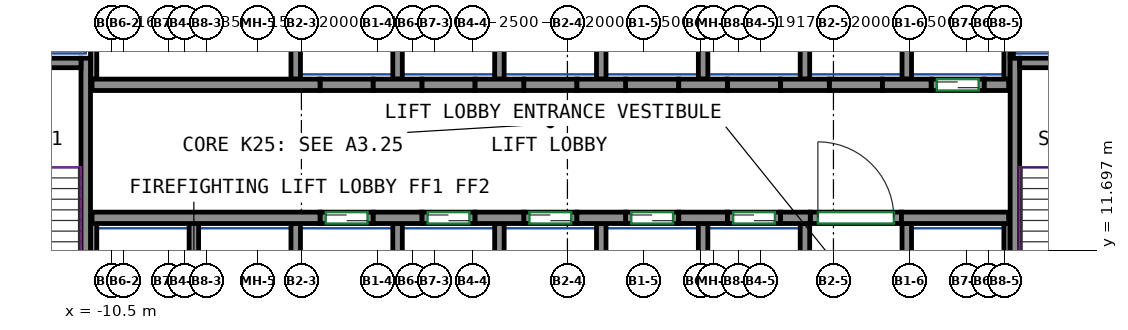
"""IFC4 building model, lengths in metres.
Left out: names, types, materials, properties, quantities, classifications, styles, units other than length and angle.
Written with IfcOpenShell. Run it as: python <this file> out.ifc"""

import sys

from ifc_helpers import new_model, si_unit, direction, frame, frame_2d, origin, place, context, subcontext, project, spatial, rectangle, extrude, source, transform, mapped, element, fill, save


model = new_model("IFC4")
c1 = context("Model", 3, precision=1e-05, world=origin(), true_north=direction((0.0, 1.0)))
c2 = subcontext(c1, "Body", "Model", "MODEL_VIEW")
j1 = project(units=[si_unit("LENGTHUNIT", "METRE"), si_unit("PLANEANGLEUNIT", "RADIAN")], contexts=[c1])
p1 = place(None, origin())
s1 = spatial("IfcSite", under=j1, at=p1, CompositionType="ELEMENT")
p2 = place(p1, origin())
s2 = spatial("IfcBuilding", under=s1, at=p2, CompositionType="ELEMENT")
p3 = place(p2, frame((0.0, 0.0, 104.6)))
s3 = spatial("IfcBuildingStorey", under=s2, at=p3, CompositionType="ELEMENT", Elevation=104.6)
m1 = source(origin(), c2, "Body", "SweptSolid", [
    extrude(rectangle(XDim=7.75, YDim=0.25, at=frame_2d((3.875, 0.0))), origin(), (0.0, 0.0, 1.0), 3.72),
])
p4 = place(p3, frame((-11.175, 9.0, 0.0), z_axis=(0.0, 0.0, 1.0), x_axis=(0.0, 1.0, 0.0)))
e1 = element("IfcWall", 1, at=p4, inside=s3, PredefinedType="SHEAR", context=c2, shape_type="MappedRepresentation", body=[
    mapped(m1, transform((0.0, 0.0, 0.0))),
])
m2 = source(origin(), c2, "Body", "SweptSolid", [
    extrude(rectangle(XDim=3.7, YDim=0.25, at=frame_2d((1.85, 0.0))), origin(), (0.0, 0.0, 1.0), 3.72),
])
p5 = place(p3, frame((-15.0, 16.625, 0.0), z_axis=(0.0, 0.0, 1.0), x_axis=(1.0, 0.0, 0.0)))
e2 = element("IfcWall", 2, at=p5, inside=s3, PredefinedType="SHEAR", context=c2, shape_type="MappedRepresentation", body=[
    mapped(m2, transform((0.0, 0.0, 0.0))),
])
p6 = place(p3, frame((13.275, 9.0, 0.0), z_axis=(0.0, 0.0, 1.0), x_axis=(0.0, 1.0, 0.0)))
e3 = element("IfcWall", 3, at=p6, inside=s3, PredefinedType="SHEAR", context=c2, shape_type="MappedRepresentation", body=[
    mapped(m1, transform((0.0, 0.0, 0.0))),
])
m3 = source(origin(), c2, "Body", "SweptSolid", [
    extrude(rectangle(XDim=3.7, YDim=0.25, at=frame_2d((1.85, 0.0))), origin(), (0.0, 0.0, 1.0), 3.72),
])
p7 = place(p3, frame((13.4, 16.625, 0.0), z_axis=(0.0, 0.0, 1.0), x_axis=(1.0, 0.0, 0.0)))
e4 = element("IfcWall", 4, at=p7, inside=s3, PredefinedType="SHEAR", context=c2, shape_type="MappedRepresentation", body=[
    mapped(m3, transform((0.0, 0.0, 0.0))),
])
m4 = source(origin(), c2, "Body", "SweptSolid", [
    extrude(rectangle(XDim=6.0, YDim=0.3, at=frame_2d((3.0, 0.0))), origin(), (0.0, 0.0, 1.0), 3.72),
])
p8 = place(p3, frame((-11.01, 12.55, 0.0), z_axis=(0.0, 0.0, 1.0), x_axis=(1.0, 0.0, 0.0)))
e5 = element("IfcWall", 5, at=p8, inside=s3, PredefinedType="SHEAR", context=c2, shape_type="MappedRepresentation", body=[
    mapped(m4, transform((0.0, 0.0, 0.0))),
])
m5 = source(origin(), c2, "Body", "SweptSolid", [
    extrude(rectangle(XDim=1.28, YDim=0.3, at=frame_2d((0.64, 0.0))), origin(), (0.0, 0.0, 1.0), 3.72),
])
for number, where, z_axis, x_axis in (
    (6, (-3.61, 12.55, 0.0), (0.0, 0.0, 1.0), (1.0, 0.0, 0.0)),
    (7, (-0.93, 12.55, 0.0), (0.0, 0.0, 1.0), (1.0, 0.0, 0.0)),
    (8, (1.75, 12.55, 0.0), (0.0, 0.0, 1.0), (1.0, 0.0, 0.0)),
    (9, (4.43, 12.55, 0.0), (0.0, 0.0, 1.0), (1.0, 0.0, 0.0)),
):
    element("IfcWall", number, at=place(p3, frame(where, z_axis=z_axis, x_axis=x_axis)), inside=s3, PredefinedType="SHEAR", context=c2, shape_type="MappedRepresentation", body=[
        mapped(m5, transform((0.0, 0.0, 0.0))),
    ])
m6 = source(origin(), c2, "Body", "SweptSolid", [
    extrude(rectangle(XDim=0.78, YDim=0.3, at=frame_2d((0.39, 0.0))), origin(), (0.0, 0.0, 1.0), 3.72),
])
p9 = place(p3, frame((7.11, 12.55, 0.0), z_axis=(0.0, 0.0, 1.0), x_axis=(1.0, 0.0, 0.0)))
e10 = element("IfcWall", 10, at=p9, inside=s3, PredefinedType="SHEAR", context=c2, shape_type="MappedRepresentation", body=[
    mapped(m6, transform((0.0, 0.0, 0.0))),
])
m7 = source(origin(), c2, "Body", "SweptSolid", [
    extrude(rectangle(XDim=2.82, YDim=0.3, at=frame_2d((1.41, 0.0))), origin(), (0.0, 0.0, 1.0), 3.72),
])
p10 = place(p3, frame((10.29, 12.55, 0.0), z_axis=(0.0, 0.0, 1.0), x_axis=(1.0, 0.0, 0.0)))
e11 = element("IfcWall", 11, at=p10, inside=s3, PredefinedType="SHEAR", context=c2, shape_type="MappedRepresentation", body=[
    mapped(m7, transform((0.0, 0.0, 0.0))),
])
p11 = place(p3, frame((-11.01, 16.05, 0.0), z_axis=(0.0, 0.0, 1.0), x_axis=(1.0, 0.0, 0.0)))
e12 = element("IfcWall", 12, at=p11, inside=s3, PredefinedType="SHEAR", context=c2, shape_type="MappedRepresentation", body=[
    mapped(m4, transform((0.0, 0.0, 0.0))),
])
for number, where, z_axis, x_axis in (
    (13, (-3.61, 16.05, 0.0), (0.0, 0.0, 1.0), (1.0, 0.0, 0.0)),
    (14, (-0.93, 16.05, 0.0), (0.0, 0.0, 1.0), (1.0, 0.0, 0.0)),
    (15, (1.75, 16.05, 0.0), (0.0, 0.0, 1.0), (1.0, 0.0, 0.0)),
    (16, (4.43, 16.05, 0.0), (0.0, 0.0, 1.0), (1.0, 0.0, 0.0)),
):
    element("IfcWall", number, at=place(p3, frame(where, z_axis=z_axis, x_axis=x_axis)), inside=s3, PredefinedType="SHEAR", context=c2, shape_type="MappedRepresentation", body=[
        mapped(m5, transform((0.0, 0.0, 0.0))),
    ])
m8 = source(origin(), c2, "Body", "SweptSolid", [
    extrude(rectangle(XDim=1.28, YDim=0.3, at=frame_2d((0.64, 0.0))), origin(), (0.0, 0.0, 1.0), 3.72),
])
p12 = place(p3, frame((7.11, 16.05, 0.0), z_axis=(0.0, 0.0, 1.0), x_axis=(1.0, 0.0, 0.0)))
e17 = element("IfcWall", 17, at=p12, inside=s3, PredefinedType="SHEAR", context=c2, shape_type="MappedRepresentation", body=[
    mapped(m8, transform((0.0, 0.0, 0.0))),
])
p13 = place(p3, frame((9.79, 16.05, 0.0), z_axis=(0.0, 0.0, 1.0), x_axis=(1.0, 0.0, 0.0)))
e18 = element("IfcWall", 18, at=p13, inside=s3, PredefinedType="SHEAR", context=c2, shape_type="MappedRepresentation", body=[
    mapped(m5, transform((0.0, 0.0, 0.0))),
])
m9 = source(origin(), c2, "Body", "SweptSolid", [
    extrude(rectangle(XDim=0.64, YDim=0.3, at=frame_2d((0.32, 0.0))), origin(), (0.0, 0.0, 1.0), 3.72),
])
p14 = place(p3, frame((12.47, 16.05, 0.0), z_axis=(0.0, 0.0, 1.0), x_axis=(1.0, 0.0, 0.0)))
e19 = element("IfcWall", 19, at=p14, inside=s3, PredefinedType="SHEAR", context=c2, shape_type="MappedRepresentation", body=[
    mapped(m9, transform((0.0, 0.0, 0.0))),
])
m10 = source(origin(), c2, "Body", "SweptSolid", [
    extrude(rectangle(XDim=1.4, YDim=0.3, at=frame_2d((0.7, 0.0))), origin(), (0.0, 0.0, 1.0), 3.72),
])
p15 = place(p3, frame((-5.01, 12.55, 0.0), z_axis=(0.0, 0.0, 1.0), x_axis=(1.0, 0.0, 0.0)))
e20 = element("IfcWall", 20, at=p15, inside=s3, PredefinedType="PARTITIONING", context=c2, shape_type="MappedRepresentation", body=[
    mapped(m10, transform((0.0, 0.0, 0.0))),
])
p16 = place(p15, frame((0.15, 0.0, 0.0)))
e21 = element("IfcOpeningElement", 21, at=p16, cuts=e20, PredefinedType="OPENING", context=c2, shape_type="SweptSolid", body=[
    extrude(rectangle(XDim=1.1, YDim=2.1, at=frame_2d((0.55, 1.05))), frame((0.0, 0.16, 0.0), z_axis=(0.0, -1.0, 0.0), x_axis=(1.0, 0.0, 0.0)), (0.0, 0.0, 1.0), 0.32),
])
m11 = source(origin(), c2, "Body", "SweptSolid", [
    extrude(rectangle(XDim=1.4, YDim=0.3, at=frame_2d((0.7, 0.0))), origin(), (0.0, 0.0, 1.0), 3.72),
])
p17 = place(p3, frame((-2.33, 12.55, 0.0), z_axis=(0.0, 0.0, 1.0), x_axis=(1.0, 0.0, 0.0)))
e22 = element("IfcWall", 22, at=p17, inside=s3, PredefinedType="PARTITIONING", context=c2, shape_type="MappedRepresentation", body=[
    mapped(m11, transform((0.0, 0.0, 0.0))),
])
p18 = place(p17, frame((0.15, 0.0, 0.0)))
e23 = element("IfcOpeningElement", 23, at=p18, cuts=e22, PredefinedType="OPENING", context=c2, shape_type="SweptSolid", body=[
    extrude(rectangle(XDim=1.1, YDim=2.1, at=frame_2d((0.55, 1.05))), frame((0.0, 0.16, 0.0), z_axis=(0.0, -1.0, 0.0), x_axis=(1.0, 0.0, 0.0)), (0.0, 0.0, 1.0), 0.32),
])
p19 = place(p3, frame((0.35, 12.55, 0.0), z_axis=(0.0, 0.0, 1.0), x_axis=(1.0, 0.0, 0.0)))
e24 = element("IfcWall", 24, at=p19, inside=s3, PredefinedType="PARTITIONING", context=c2, shape_type="MappedRepresentation", body=[
    mapped(m10, transform((0.0, 0.0, 0.0))),
])
p20 = place(p19, frame((0.15, 0.0, 0.0)))
e25 = element("IfcOpeningElement", 25, at=p20, cuts=e24, PredefinedType="OPENING", context=c2, shape_type="SweptSolid", body=[
    extrude(rectangle(XDim=1.1, YDim=2.1, at=frame_2d((0.55, 1.05))), frame((0.0, 0.16, 0.0), z_axis=(0.0, -1.0, 0.0), x_axis=(1.0, 0.0, 0.0)), (0.0, 0.0, 1.0), 0.32),
])
p21 = place(p3, frame((3.03, 12.55, 0.0), z_axis=(0.0, 0.0, 1.0), x_axis=(1.0, 0.0, 0.0)))
e26 = element("IfcWall", 26, at=p21, inside=s3, PredefinedType="PARTITIONING", context=c2, shape_type="MappedRepresentation", body=[
    mapped(m10, transform((0.0, 0.0, 0.0))),
])
p22 = place(p21, frame((0.15, 0.0, 0.0)))
e27 = element("IfcOpeningElement", 27, at=p22, cuts=e26, PredefinedType="OPENING", context=c2, shape_type="SweptSolid", body=[
    extrude(rectangle(XDim=1.1, YDim=2.1, at=frame_2d((0.55, 1.05))), frame((0.0, 0.16, 0.0), z_axis=(0.0, -1.0, 0.0), x_axis=(1.0, 0.0, 0.0)), (0.0, 0.0, 1.0), 0.32),
])
p23 = place(p3, frame((5.71, 12.55, 0.0), z_axis=(0.0, 0.0, 1.0), x_axis=(1.0, 0.0, 0.0)))
e28 = element("IfcWall", 28, at=p23, inside=s3, PredefinedType="PARTITIONING", context=c2, shape_type="MappedRepresentation", body=[
    mapped(m11, transform((0.0, 0.0, 0.0))),
])
p24 = place(p23, frame((0.15, 0.0, 0.0)))
e29 = element("IfcOpeningElement", 29, at=p24, cuts=e28, PredefinedType="OPENING", context=c2, shape_type="SweptSolid", body=[
    extrude(rectangle(XDim=1.1, YDim=2.1, at=frame_2d((0.55, 1.05))), frame((0.0, 0.16, 0.0), z_axis=(0.0, -1.0, 0.0), x_axis=(1.0, 0.0, 0.0)), (0.0, 0.0, 1.0), 0.32),
])
p25 = place(p3, frame((11.07, 16.05, 0.0), z_axis=(0.0, 0.0, 1.0), x_axis=(1.0, 0.0, 0.0)))
e30 = element("IfcWall", 30, at=p25, inside=s3, PredefinedType="PARTITIONING", context=c2, shape_type="MappedRepresentation", body=[
    mapped(m10, transform((0.0, 0.0, 0.0))),
])
p26 = place(p25, frame((0.15, 0.0, 0.0)))
e31 = element("IfcOpeningElement", 31, at=p26, cuts=e30, PredefinedType="OPENING", context=c2, shape_type="SweptSolid", body=[
    extrude(rectangle(XDim=1.1, YDim=2.1, at=frame_2d((0.55, 1.05))), frame((0.0, 0.16, 0.0), z_axis=(0.0, -1.0, 0.0), x_axis=(1.0, 0.0, 0.0)), (0.0, 0.0, 1.0), 0.32),
])
m12 = source(origin(), c2, "Body", "SweptSolid", [
    extrude(rectangle(XDim=2.4, YDim=0.3, at=frame_2d((1.2, 0.0))), origin(), (0.0, 0.0, 1.0), 3.72),
])
p27 = place(p3, frame((7.89, 12.55, 0.0), z_axis=(0.0, 0.0, 1.0), x_axis=(1.0, 0.0, 0.0)))
e32 = element("IfcWall", 32, at=p27, inside=s3, PredefinedType="PARTITIONING", context=c2, shape_type="MappedRepresentation", body=[
    mapped(m12, transform((0.0, 0.0, 0.0))),
])
p28 = place(p27, frame((0.2, 0.0, 0.0)))
e33 = element("IfcOpeningElement", 33, at=p28, cuts=e32, PredefinedType="OPENING", context=c2, shape_type="SweptSolid", body=[
    extrude(rectangle(XDim=2.0, YDim=2.1, at=frame_2d((1.0, 1.05))), frame((0.0, 0.16, 0.0), z_axis=(0.0, -1.0, 0.0), x_axis=(1.0, 0.0, 0.0)), (0.0, 0.0, 1.0), 0.32),
])
p29 = place(p3, frame((-5.01, 16.05, 0.0), z_axis=(0.0, 0.0, 1.0), x_axis=(1.0, 0.0, 0.0)))
e34 = element("IfcWall", 34, at=p29, inside=s3, PredefinedType="PARTITIONING", context=c2, shape_type="MappedRepresentation", body=[
    mapped(m10, transform((0.0, 0.0, 0.0))),
])
p30 = place(p3, frame((-2.33, 16.05, 0.0), z_axis=(0.0, 0.0, 1.0), x_axis=(1.0, 0.0, 0.0)))
e35 = element("IfcWall", 35, at=p30, inside=s3, PredefinedType="PARTITIONING", context=c2, shape_type="MappedRepresentation", body=[
    mapped(m11, transform((0.0, 0.0, 0.0))),
])
for number, where, z_axis, x_axis in (
    (36, (0.35, 16.05, 0.0), (0.0, 0.0, 1.0), (1.0, 0.0, 0.0)),
    (37, (3.03, 16.05, 0.0), (0.0, 0.0, 1.0), (1.0, 0.0, 0.0)),
):
    element("IfcWall", number, at=place(p3, frame(where, z_axis=z_axis, x_axis=x_axis)), inside=s3, PredefinedType="PARTITIONING", context=c2, shape_type="MappedRepresentation", body=[
        mapped(m10, transform((0.0, 0.0, 0.0))),
    ])
for number, where, z_axis, x_axis in (
    (38, (5.71, 16.05, 0.0), (0.0, 0.0, 1.0), (1.0, 0.0, 0.0)),
    (39, (8.39, 16.05, 0.0), (0.0, 0.0, 1.0), (1.0, 0.0, 0.0)),
):
    element("IfcWall", number, at=place(p3, frame(where, z_axis=z_axis, x_axis=x_axis)), inside=s3, PredefinedType="PARTITIONING", context=c2, shape_type="MappedRepresentation", body=[
        mapped(m11, transform((0.0, 0.0, 0.0))),
    ])
m13 = source(origin(), c2, "Body", "SweptSolid", [
    extrude(rectangle(XDim=3.275, YDim=0.165, at=frame_2d((1.638, 0.0))), origin(), (0.0, 0.0, 1.0), 3.72),
])
p31 = place(p3, frame((13.067, 16.2, 0.0), z_axis=(0.0, 0.0, 1.0), x_axis=(0.0, 1.0, 0.0)))
e40 = element("IfcWall", 40, at=p31, inside=s3, PredefinedType="PARTITIONING", context=c2, shape_type="MappedRepresentation", body=[
    mapped(m13, transform((0.0, 0.0, 0.0))),
])
m14 = source(origin(), c2, "Body", "SweptSolid", [
    extrude(rectangle(XDim=4.8, YDim=0.165, at=frame_2d((2.4, 0.0))), origin(), (0.0, 0.0, 1.0), 3.72),
])
p32 = place(p3, frame((-10.968, 16.2, 0.0), z_axis=(0.0, 0.0, 1.0), x_axis=(0.0, 1.0, 0.0)))
e41 = element("IfcWall", 41, at=p32, inside=s3, PredefinedType="PARTITIONING", context=c2, shape_type="MappedRepresentation", body=[
    mapped(m14, transform((0.0, 0.0, 0.0))),
])
m15 = source(origin(), c2, "Body", "SweptSolid", [
    extrude(rectangle(XDim=3.275, YDim=0.25, at=frame_2d((1.638, 0.0))), origin(), (0.0, 0.0, 1.0), 3.72),
])
p33 = place(p3, frame((10.43, 16.2, 0.0), z_axis=(0.0, 0.0, 1.0), x_axis=(0.0, 1.0, 0.0)))
e42 = element("IfcWall", 42, at=p33, inside=s3, PredefinedType="PARTITIONING", context=c2, shape_type="MappedRepresentation", body=[
    mapped(m15, transform((0.0, 0.0, 0.0))),
])
m16 = source(origin(), c2, "Body", "SweptSolid", [
    extrude(rectangle(XDim=2.725, YDim=0.085, at=frame_2d((1.363, 0.0))), origin(), (0.0, 0.0, 1.0), 3.72),
])
p34 = place(p3, frame((13.192, 16.75, 0.0), z_axis=(0.0, 0.0, 1.0), x_axis=(0.0, 1.0, 0.0)))
e43 = element("IfcWall", 43, at=p34, inside=s3, PredefinedType="PARTITIONING", context=c2, shape_type="MappedRepresentation", body=[
    mapped(m16, transform((0.0, 0.0, 0.0))),
])
for number, where, z_axis, x_axis in (
    (44, (2.39, 16.2, 0.0), (0.0, 0.0, 1.0), (0.0, 1.0, 0.0)),
    (45, (5.07, 16.2, 0.0), (0.0, 0.0, 1.0), (0.0, 1.0, 0.0)),
    (46, (7.75, 16.2, 0.0), (0.0, 0.0, 1.0), (0.0, 1.0, 0.0)),
    (47, (-0.29, 16.2, 0.0), (0.0, 0.0, 1.0), (0.0, 1.0, 0.0)),
    (48, (-2.97, 16.2, 0.0), (0.0, 0.0, 1.0), (0.0, 1.0, 0.0)),
    (49, (-5.65, 16.2, 0.0), (0.0, 0.0, 1.0), (0.0, 1.0, 0.0)),
):
    element("IfcWall", number, at=place(p3, frame(where, z_axis=z_axis, x_axis=x_axis)), inside=s3, PredefinedType="PARTITIONING", context=c2, shape_type="MappedRepresentation", body=[
        mapped(m15, transform((0.0, 0.0, 0.0))),
    ])
m17 = source(origin(), c2, "Body", "SweptSolid", [
    extrude(rectangle(XDim=3.4, YDim=0.25, at=frame_2d((1.7, 0.0))), origin(), (0.0, 0.0, 1.0), 3.72),
])
p35 = place(p3, frame((10.43, 9.0, 0.0), z_axis=(0.0, 0.0, 1.0), x_axis=(0.0, 1.0, 0.0)))
e50 = element("IfcWall", 50, at=p35, inside=s3, PredefinedType="PARTITIONING", context=c2, shape_type="MappedRepresentation", body=[
    mapped(m17, transform((0.0, 0.0, 0.0))),
])
m18 = source(origin(), c2, "Body", "SweptSolid", [
    extrude(rectangle(XDim=3.4, YDim=0.165, at=frame_2d((1.7, 0.0))), origin(), (0.0, 0.0, 1.0), 3.72),
])
p36 = place(p3, frame((13.067, 9.0, 0.0), z_axis=(0.0, 0.0, 1.0), x_axis=(0.0, 1.0, 0.0)))
e51 = element("IfcWall", 51, at=p36, inside=s3, PredefinedType="PARTITIONING", context=c2, shape_type="MappedRepresentation", body=[
    mapped(m18, transform((0.0, 0.0, 0.0))),
])
for number, where, z_axis, x_axis in (
    (52, (2.39, 9.0, 0.0), (0.0, 0.0, 1.0), (0.0, 1.0, 0.0)),
    (53, (5.07, 9.0, 0.0), (0.0, 0.0, 1.0), (0.0, 1.0, 0.0)),
    (54, (7.75, 9.0, 0.0), (0.0, 0.0, 1.0), (0.0, 1.0, 0.0)),
    (55, (-0.29, 9.0, 0.0), (0.0, 0.0, 1.0), (0.0, 1.0, 0.0)),
):
    element("IfcWall", number, at=place(p3, frame(where, z_axis=z_axis, x_axis=x_axis)), inside=s3, PredefinedType="PARTITIONING", context=c2, shape_type="MappedRepresentation", body=[
        mapped(m17, transform((0.0, 0.0, 0.0))),
    ])
p37 = place(p3, frame((-10.968, 9.0, 0.0), z_axis=(0.0, 0.0, 1.0), x_axis=(0.0, 1.0, 0.0)))
e56 = element("IfcWall", 56, at=p37, inside=s3, PredefinedType="PARTITIONING", context=c2, shape_type="MappedRepresentation", body=[
    mapped(m18, transform((0.0, 0.0, 0.0))),
])
for number, where, z_axis, x_axis in (
    (57, (-2.97, 9.0, 0.0), (0.0, 0.0, 1.0), (0.0, 1.0, 0.0)),
    (58, (-5.65, 9.0, 0.0), (0.0, 0.0, 1.0), (0.0, 1.0, 0.0)),
    (59, (-8.33, 9.0, 0.0), (0.0, 0.0, 1.0), (0.0, 1.0, 0.0)),
):
    element("IfcWall", number, at=place(p3, frame(where, z_axis=z_axis, x_axis=x_axis)), inside=s3, PredefinedType="PARTITIONING", context=c2, shape_type="MappedRepresentation", body=[
        mapped(m17, transform((0.0, 0.0, 0.0))),
    ])
p38 = place(p28, origin())
e60 = element("IfcDoor", 60, at=p38, inside=s3, OperationType="DOUBLE_DOOR_SINGLE_SWING", PredefinedType="DOOR", context=c2, shape_type="SweptSolid", body=[
    extrude(rectangle(XDim=2.0, YDim=2.1, at=frame_2d((1.0, 1.05))), frame((0.0, 0.025, 0.0), z_axis=(0.0, -1.0, 0.0), x_axis=(1.0, 0.0, 0.0)), (0.0, 0.0, 1.0), 0.05),
])
fill(e33, e60)
p39 = place(p16, origin())
e61 = element("IfcDoor", 61, at=p39, inside=s3, OperationType="DOUBLE_DOOR_SLIDING", PredefinedType="DOOR", context=c2, shape_type="SweptSolid", body=[
    extrude(rectangle(XDim=1.1, YDim=2.1, at=frame_2d((0.55, 1.05))), frame((0.0, 0.025, 0.0), z_axis=(0.0, -1.0, 0.0), x_axis=(1.0, 0.0, 0.0)), (0.0, 0.0, 1.0), 0.05),
])
fill(e21, e61)
p40 = place(p18, origin())
e62 = element("IfcDoor", 62, at=p40, inside=s3, OperationType="DOUBLE_DOOR_SLIDING", PredefinedType="DOOR", context=c2, shape_type="SweptSolid", body=[
    extrude(rectangle(XDim=1.1, YDim=2.1, at=frame_2d((0.55, 1.05))), frame((0.0, 0.025, 0.0), z_axis=(0.0, -1.0, 0.0), x_axis=(1.0, 0.0, 0.0)), (0.0, 0.0, 1.0), 0.05),
])
fill(e23, e62)
p41 = place(p20, origin())
e63 = element("IfcDoor", 63, at=p41, inside=s3, OperationType="DOUBLE_DOOR_SLIDING", PredefinedType="DOOR", context=c2, shape_type="SweptSolid", body=[
    extrude(rectangle(XDim=1.1, YDim=2.1, at=frame_2d((0.55, 1.05))), frame((0.0, 0.025, 0.0), z_axis=(0.0, -1.0, 0.0), x_axis=(1.0, 0.0, 0.0)), (0.0, 0.0, 1.0), 0.05),
])
fill(e25, e63)
p42 = place(p22, origin())
e64 = element("IfcDoor", 64, at=p42, inside=s3, OperationType="DOUBLE_DOOR_SLIDING", PredefinedType="DOOR", context=c2, shape_type="SweptSolid", body=[
    extrude(rectangle(XDim=1.1, YDim=2.1, at=frame_2d((0.55, 1.05))), frame((0.0, 0.025, 0.0), z_axis=(0.0, -1.0, 0.0), x_axis=(1.0, 0.0, 0.0)), (0.0, 0.0, 1.0), 0.05),
])
fill(e27, e64)
p43 = place(p24, origin())
e65 = element("IfcDoor", 65, at=p43, inside=s3, OperationType="DOUBLE_DOOR_SLIDING", PredefinedType="DOOR", context=c2, shape_type="SweptSolid", body=[
    extrude(rectangle(XDim=1.1, YDim=2.1, at=frame_2d((0.55, 1.05))), frame((0.0, 0.025, 0.0), z_axis=(0.0, -1.0, 0.0), x_axis=(1.0, 0.0, 0.0)), (0.0, 0.0, 1.0), 0.05),
])
fill(e29, e65)
p44 = place(p26, origin())
e66 = element("IfcDoor", 66, at=p44, inside=s3, OperationType="DOUBLE_DOOR_SLIDING", PredefinedType="DOOR", context=c2, shape_type="SweptSolid", body=[
    extrude(rectangle(XDim=1.1, YDim=2.1, at=frame_2d((0.55, 1.05))), frame((0.0, 0.025, 0.0), z_axis=(0.0, -1.0, 0.0), x_axis=(1.0, 0.0, 0.0)), (0.0, 0.0, 1.0), 0.05),
])
fill(e31, e66)
save(model, sys.argv[1])
